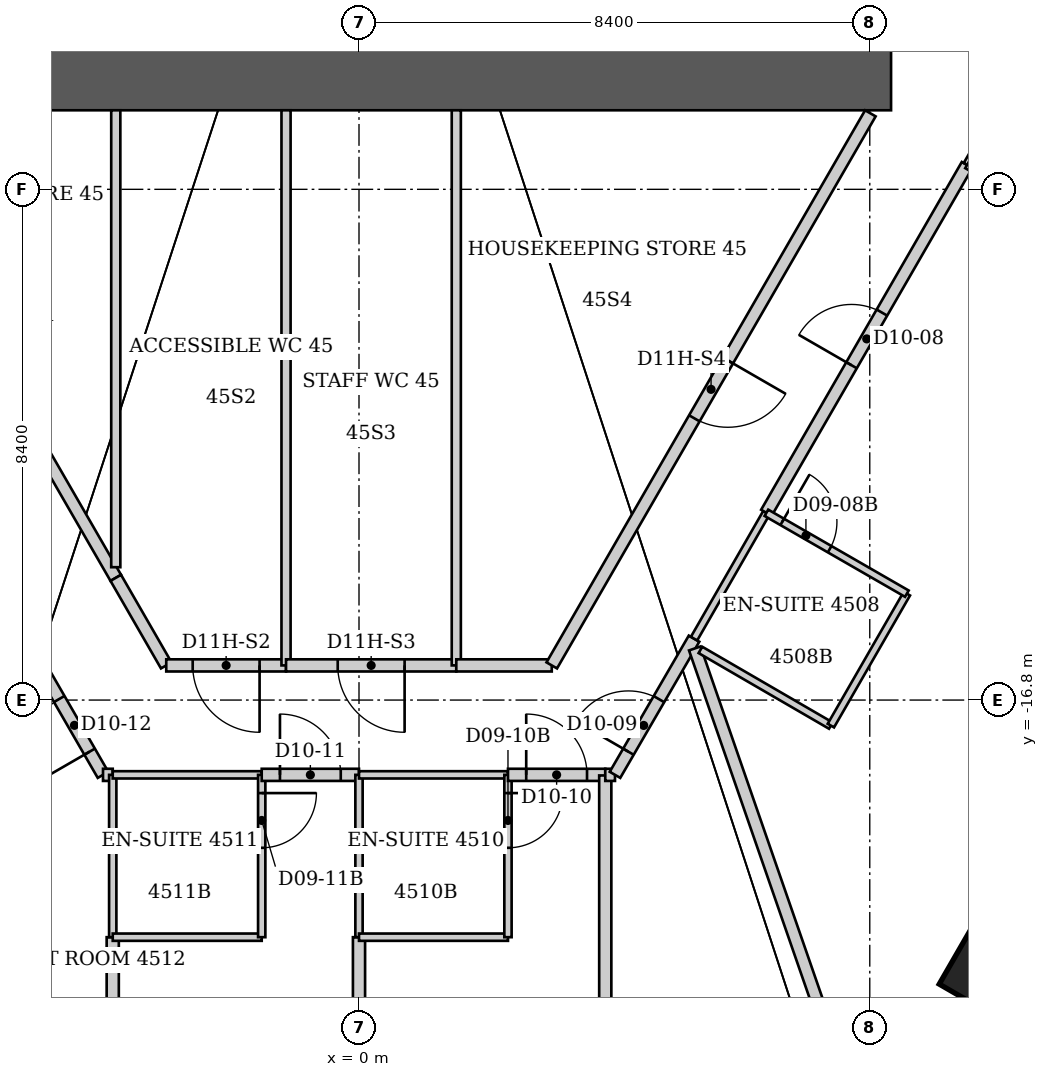
"""IFC4 building model, lengths in metres.
Left out: names, types, materials, properties, quantities, classifications, styles, units other than length and angle.
Written with IfcOpenShell. Run it as: python <this file> out.ifc"""

import sys

from ifc_helpers import new_model, si_unit, direction, frame, frame_2d, origin, origin_2d, place, context, subcontext, project, spatial, rectangle, extrude, element, fill, save


model = new_model("IFC4")
c1 = context("Model", 3, precision=1e-05, world=origin(), true_north=direction((0.0, 1.0)))
c2 = subcontext(c1, "Body", "Model", "MODEL_VIEW")
j1 = project(units=[si_unit("LENGTHUNIT", "METRE"), si_unit("PLANEANGLEUNIT", "RADIAN")], contexts=[c1])
p1 = place(None, origin())
s1 = spatial("IfcSite", under=j1, at=p1, CompositionType="ELEMENT")
p2 = place(p1, origin())
s2 = spatial("IfcBuilding", under=s1, at=p2, CompositionType="ELEMENT")
p3 = place(p2, frame((0.0, 0.0, 183.2)))
s3 = spatial("IfcBuildingStorey", under=s2, at=p3, CompositionType="ELEMENT", Elevation=183.2)
p4 = place(p3, frame((10.772, -21.142, 0.0), z_axis=(0.0, 0.0, 1.0), x_axis=(0.866025403784, -0.5, 0.0)))
e1 = element("IfcColumn", 1, at=p4, inside=s3, PredefinedType="COLUMN", context=c2, shape_type="SweptSolid", body=[
    extrude(rectangle(XDim=1.8, YDim=1.8, at=origin_2d()), origin(), (0.0, 0.0, 1.0), 3.8),
])
p5 = place(p3, frame((-8.75, -6.6, 0.0), z_axis=(0.0, 0.0, 1.0), x_axis=(1.0, 0.0, 0.0)))
e2 = element("IfcWall", 2, at=p5, inside=s3, PredefinedType="SHEAR", context=c2, shape_type="SweptSolid", body=[
    extrude(rectangle(XDim=17.5, YDim=1.0, at=frame_2d((8.75, 0.0))), origin(), (0.0, 0.0, 1.0), 3.8),
])
p6 = place(p3, frame((-5.48, -15.83, 0.0), z_axis=(0.0, 0.0, 1.0), x_axis=(0.499963722229, -0.866046347752, 0.0)))
e3 = element("IfcWall", 3, at=p6, inside=s3, PredefinedType="PARTITIONING", context=c2, shape_type="SweptSolid", body=[
    extrude(rectangle(XDim=2.54, YDim=0.2, at=frame_2d((1.27, 0.0))), origin(), (0.0, 0.0, 1.0), 3.64),
])
p7 = place(p6, frame((1.1, 0.0, 0.0)))
e4 = element("IfcOpeningElement", 4, at=p7, cuts=e3, PredefinedType="OPENING", context=c2, shape_type="SweptSolid", body=[
    extrude(rectangle(XDim=1.0, YDim=2.13, at=frame_2d((0.5, 1.065))), frame((0.0, 0.1, 0.0), z_axis=(0.0, -1.0, 0.0), x_axis=(1.0, 0.0, 0.0)), (0.0, 0.0, 1.0), 0.2),
])
p8 = place(p3, frame((-4.21, -18.03, 0.0), z_axis=(0.0, 0.0, 1.0), x_axis=(1.0, 0.0, 0.0)))
e5 = element("IfcWall", 5, at=p8, inside=s3, PredefinedType="PARTITIONING", context=c2, shape_type="SweptSolid", body=[
    extrude(rectangle(XDim=0.16, YDim=0.2, at=frame_2d((0.08, 0.0))), origin(), (0.0, 0.0, 1.0), 3.64),
])
p9 = place(p3, frame((-4.05, -21.77, 0.0), z_axis=(0.0, 0.0, 1.0), x_axis=(0.0, 1.0, 0.0)))
e6 = element("IfcWall", 6, at=p9, inside=s3, PredefinedType="PARTITIONING", context=c2, shape_type="SweptSolid", body=[
    extrude(rectangle(XDim=1.07, YDim=0.2, at=frame_2d((0.535, 0.0))), origin(), (0.0, 0.0, 1.0), 3.64),
])
p10 = place(p3, frame((-4.05, -20.7, 0.0), z_axis=(0.0, 0.0, 1.0), x_axis=(0.0, 1.0, 0.0)))
e7 = element("IfcWall", 7, at=p10, inside=s3, PredefinedType="PARTITIONING", context=c2, shape_type="SweptSolid", body=[
    extrude(rectangle(XDim=2.67, YDim=0.12, at=frame_2d((1.335, 0.0))), origin(), (0.0, 0.0, 1.0), 3.64),
])
for number, where, z_axis, x_axis in (
    (8, (-4.05, -20.7, 0.0), (0.0, 0.0, 1.0), (1.0, 0.0, 0.0)),
    (9, (-4.05, -18.03, 0.0), (0.0, 0.0, 1.0), (1.0, 0.0, 0.0)),
):
    element("IfcWall", number, at=place(p3, frame(where, z_axis=z_axis, x_axis=x_axis)), inside=s3, PredefinedType="PARTITIONING", context=c2, shape_type="SweptSolid", body=[
        extrude(rectangle(XDim=2.45, YDim=0.12, at=frame_2d((1.225, 0.0))), origin(), (0.0, 0.0, 1.0), 3.64),
    ])
p11 = place(p3, frame((-4.0, -14.79, 0.0), z_axis=(0.0, 0.0, 1.0), x_axis=(-0.499916512745, 0.866073599808, 0.0)))
e10 = element("IfcWall", 10, at=p11, inside=s3, PredefinedType="PARTITIONING", context=c2, shape_type="SweptSolid", body=[
    extrude(rectangle(XDim=8.821, YDim=0.2, at=frame_2d((4.411, 0.0))), origin(), (0.0, 0.0, 1.0), 3.64),
])
p12 = place(p11, frame((3.861, 0.0, 0.0)))
e11 = element("IfcOpeningElement", 11, at=p12, cuts=e10, PredefinedType="OPENING", context=c2, shape_type="SweptSolid", body=[
    extrude(rectangle(XDim=1.1, YDim=2.2, at=frame_2d((0.55, 1.1))), frame((0.0, 0.1, 0.0), z_axis=(0.0, -1.0, 0.0), x_axis=(1.0, 0.0, 0.0)), (0.0, 0.0, 1.0), 0.2),
])
p13 = place(p3, frame((-4.0, -7.1, 0.0), z_axis=(0.0, 0.0, 1.0), x_axis=(0.0, -1.0, 0.0)))
e12 = element("IfcWall", 12, at=p13, inside=s3, PredefinedType="PARTITIONING", context=c2, shape_type="SweptSolid", body=[
    extrude(rectangle(XDim=7.515, YDim=0.15, at=frame_2d((3.757, 0.0))), origin(), (0.0, 0.0, 1.0), 3.64),
])
p14 = place(p3, frame((-3.17, -16.23, 0.0), z_axis=(0.0, 0.0, 1.0), x_axis=(-0.499425709803, 0.866356716594, 0.0)))
e13 = element("IfcWall", 13, at=p14, inside=s3, PredefinedType="PARTITIONING", context=c2, shape_type="SweptSolid", body=[
    extrude(rectangle(XDim=1.662, YDim=0.2, at=frame_2d((0.831, 0.0))), origin(), (0.0, 0.0, 1.0), 3.64),
])
p15 = place(p3, frame((-1.6, -20.7, 0.0), z_axis=(0.0, 0.0, 1.0), x_axis=(0.0, 1.0, 0.0)))
e14 = element("IfcWall", 14, at=p15, inside=s3, PredefinedType="PARTITIONING", context=c2, shape_type="SweptSolid", body=[
    extrude(rectangle(XDim=2.67, YDim=0.12, at=frame_2d((1.335, 0.0))), origin(), (0.0, 0.0, 1.0), 3.64),
])
p16 = place(p15, frame((1.47, 0.0, 0.0)))
e15 = element("IfcOpeningElement", 15, at=p16, cuts=e14, PredefinedType="OPENING", context=c2, shape_type="SweptSolid", body=[
    extrude(rectangle(XDim=0.9, YDim=2.03, at=frame_2d((0.45, 1.015))), frame((0.0, 0.06, 0.0), z_axis=(0.0, -1.0, 0.0), x_axis=(1.0, 0.0, 0.0)), (0.0, 0.0, 1.0), 0.12),
])
p17 = place(p3, frame((-1.6, -18.03, 0.0), z_axis=(0.0, 0.0, 1.0), x_axis=(1.0, 0.0, 0.0)))
e16 = element("IfcWall", 16, at=p17, inside=s3, PredefinedType="PARTITIONING", context=c2, shape_type="SweptSolid", body=[
    extrude(rectangle(XDim=1.6, YDim=0.2, at=frame_2d((0.8, 0.0))), origin(), (0.0, 0.0, 1.0), 3.64),
])
p18 = place(p17, frame((0.3, 0.0, 0.0)))
e17 = element("IfcOpeningElement", 17, at=p18, cuts=e16, PredefinedType="OPENING", context=c2, shape_type="SweptSolid", body=[
    extrude(rectangle(XDim=1.0, YDim=2.13, at=frame_2d((0.5, 1.065))), frame((0.0, 0.1, 0.0), z_axis=(0.0, -1.0, 0.0), x_axis=(1.0, 0.0, 0.0)), (0.0, 0.0, 1.0), 0.2),
])
p19 = place(p3, frame((-1.2, -16.23, 0.0), z_axis=(0.0, 0.0, 1.0), x_axis=(-1.0, 0.0, 0.0)))
e18 = element("IfcWall", 18, at=p19, inside=s3, PredefinedType="PARTITIONING", context=c2, shape_type="SweptSolid", body=[
    extrude(rectangle(XDim=1.97, YDim=0.2, at=frame_2d((0.985, 0.0))), origin(), (0.0, 0.0, 1.0), 3.64),
])
p20 = place(p19, frame((0.435, 0.0, 0.0)))
e19 = element("IfcOpeningElement", 19, at=p20, cuts=e18, PredefinedType="OPENING", context=c2, shape_type="SweptSolid", body=[
    extrude(rectangle(XDim=1.1, YDim=2.2, at=frame_2d((0.55, 1.1))), frame((0.0, 0.1, 0.0), z_axis=(0.0, -1.0, 0.0), x_axis=(1.0, 0.0, 0.0)), (0.0, 0.0, 1.0), 0.2),
])
p21 = place(p3, frame((-1.2, -7.1, 0.0), z_axis=(0.0, 0.0, 1.0), x_axis=(0.0, -1.0, 0.0)))
e20 = element("IfcWall", 20, at=p21, inside=s3, PredefinedType="PARTITIONING", context=c2, shape_type="SweptSolid", body=[
    extrude(rectangle(XDim=9.13, YDim=0.15, at=frame_2d((4.565, 0.0))), origin(), (0.0, 0.0, 1.0), 3.64),
])
p22 = place(p3, frame((0.0, -26.41, 0.0), z_axis=(0.0, 0.0, 1.0), x_axis=(0.0, 1.0, 0.0)))
e21 = element("IfcWall", 21, at=p22, inside=s3, PredefinedType="PARTITIONING", context=c2, shape_type="SweptSolid", body=[
    extrude(rectangle(XDim=5.71, YDim=0.2, at=frame_2d((2.855, 0.0))), origin(), (0.0, 0.0, 1.0), 2.726),
])
p23 = place(p3, frame((0.0, -20.7, 0.0), z_axis=(0.0, 0.0, 1.0), x_axis=(0.0, 1.0, 0.0)))
e22 = element("IfcWall", 22, at=p23, inside=s3, PredefinedType="PARTITIONING", context=c2, shape_type="SweptSolid", body=[
    extrude(rectangle(XDim=2.67, YDim=0.12, at=frame_2d((1.335, 0.0))), origin(), (0.0, 0.0, 1.0), 2.726),
])
for number, where, z_axis, x_axis in (
    (23, (0.0, -20.7, 0.0), (0.0, 0.0, 1.0), (1.0, 0.0, 0.0)),
    (24, (0.0, -18.03, 0.0), (0.0, 0.0, 1.0), (1.0, 0.0, 0.0)),
):
    element("IfcWall", number, at=place(p3, frame(where, z_axis=z_axis, x_axis=x_axis)), inside=s3, PredefinedType="PARTITIONING", context=c2, shape_type="SweptSolid", body=[
        extrude(rectangle(XDim=2.45, YDim=0.12, at=frame_2d((1.225, 0.0))), origin(), (0.0, 0.0, 1.0), 3.64),
    ])
p24 = place(p3, frame((1.6, -16.23, 0.0), z_axis=(0.0, 0.0, 1.0), x_axis=(-1.0, 0.0, 0.0)))
e25 = element("IfcWall", 25, at=p24, inside=s3, PredefinedType="PARTITIONING", context=c2, shape_type="SweptSolid", body=[
    extrude(rectangle(XDim=2.8, YDim=0.2, at=frame_2d((1.4, 0.0))), origin(), (0.0, 0.0, 1.0), 3.64),
])
p25 = place(p24, frame((0.85, 0.0, 0.0)))
e26 = element("IfcOpeningElement", 26, at=p25, cuts=e25, PredefinedType="OPENING", context=c2, shape_type="SweptSolid", body=[
    extrude(rectangle(XDim=1.1, YDim=2.2, at=frame_2d((0.55, 1.1))), frame((0.0, 0.1, 0.0), z_axis=(0.0, -1.0, 0.0), x_axis=(1.0, 0.0, 0.0)), (0.0, 0.0, 1.0), 0.2),
])
p26 = place(p3, frame((1.6, -7.1, 0.0), z_axis=(0.0, 0.0, 1.0), x_axis=(0.0, -1.0, 0.0)))
e27 = element("IfcWall", 27, at=p26, inside=s3, PredefinedType="PARTITIONING", context=c2, shape_type="SweptSolid", body=[
    extrude(rectangle(XDim=9.13, YDim=0.15, at=frame_2d((4.565, 0.0))), origin(), (0.0, 0.0, 1.0), 3.64),
])
p27 = place(p3, frame((2.45, -20.7, 0.0), z_axis=(0.0, 0.0, 1.0), x_axis=(0.0, 1.0, 0.0)))
e28 = element("IfcWall", 28, at=p27, inside=s3, PredefinedType="PARTITIONING", context=c2, shape_type="SweptSolid", body=[
    extrude(rectangle(XDim=2.67, YDim=0.12, at=frame_2d((1.335, 0.0))), origin(), (0.0, 0.0, 1.0), 3.64),
])
p28 = place(p27, frame((1.47, 0.0, 0.0)))
e29 = element("IfcOpeningElement", 29, at=p28, cuts=e28, PredefinedType="OPENING", context=c2, shape_type="SweptSolid", body=[
    extrude(rectangle(XDim=0.9, YDim=2.03, at=frame_2d((0.45, 1.015))), frame((0.0, 0.06, 0.0), z_axis=(0.0, -1.0, 0.0), x_axis=(1.0, 0.0, 0.0)), (0.0, 0.0, 1.0), 0.12),
])
p29 = place(p3, frame((2.45, -18.03, 0.0), z_axis=(0.0, 0.0, 1.0), x_axis=(1.0, 0.0, 0.0)))
e30 = element("IfcWall", 30, at=p29, inside=s3, PredefinedType="PARTITIONING", context=c2, shape_type="SweptSolid", body=[
    extrude(rectangle(XDim=1.6, YDim=0.2, at=frame_2d((0.8, 0.0))), origin(), (0.0, 0.0, 1.0), 3.64),
])
p30 = place(p29, frame((0.3, 0.0, 0.0)))
e31 = element("IfcOpeningElement", 31, at=p30, cuts=e30, PredefinedType="OPENING", context=c2, shape_type="SweptSolid", body=[
    extrude(rectangle(XDim=1.0, YDim=2.13, at=frame_2d((0.5, 1.065))), frame((0.0, 0.1, 0.0), z_axis=(0.0, -1.0, 0.0), x_axis=(1.0, 0.0, 0.0)), (0.0, 0.0, 1.0), 0.2),
])
p31 = place(p3, frame((3.17, -16.23, 0.0), z_axis=(0.0, 0.0, 1.0), x_axis=(-1.0, 0.0, 0.0)))
e32 = element("IfcWall", 32, at=p31, inside=s3, PredefinedType="PARTITIONING", context=c2, shape_type="SweptSolid", body=[
    extrude(rectangle(XDim=1.57, YDim=0.2, at=frame_2d((0.785, 0.0))), origin(), (0.0, 0.0, 1.0), 3.64),
])
p32 = place(p3, frame((4.05, -21.87, 0.0), z_axis=(0.0, 0.0, 1.0), x_axis=(0.0, 1.0, 0.0)))
e33 = element("IfcWall", 33, at=p32, inside=s3, PredefinedType="PARTITIONING", context=c2, shape_type="SweptSolid", body=[
    extrude(rectangle(XDim=3.83, YDim=0.2, at=frame_2d((1.915, 0.0))), origin(), (0.0, 0.0, 1.0), 3.64),
])
p33 = place(p3, frame((4.05, -18.03, 0.0), z_axis=(0.0, 0.0, 1.0), x_axis=(1.0, 0.0, 0.0)))
e34 = element("IfcWall", 34, at=p33, inside=s3, PredefinedType="PARTITIONING", context=c2, shape_type="SweptSolid", body=[
    extrude(rectangle(XDim=0.16, YDim=0.2, at=frame_2d((0.08, 0.0))), origin(), (0.0, 0.0, 1.0), 3.64),
])
p34 = place(p3, frame((5.51, -15.79, 0.0), z_axis=(0.0, 0.0, 1.0), x_axis=(-0.501964949025, -0.864887963814, 0.0)))
e35 = element("IfcWall", 35, at=p34, inside=s3, PredefinedType="PARTITIONING", context=c2, shape_type="SweptSolid", body=[
    extrude(rectangle(XDim=2.59, YDim=0.2, at=frame_2d((1.295, 0.0))), origin(), (0.0, 0.0, 1.0), 3.64),
])
p35 = place(p34, frame((1.15, 0.0, 0.0)))
e36 = element("IfcOpeningElement", 36, at=p35, cuts=e35, PredefinedType="OPENING", context=c2, shape_type="SweptSolid", body=[
    extrude(rectangle(XDim=1.0, YDim=2.13, at=frame_2d((0.5, 1.065))), frame((0.0, 0.1, 0.0), z_axis=(0.0, -1.0, 0.0), x_axis=(1.0, 0.0, 0.0)), (0.0, 0.0, 1.0), 0.2),
])
p36 = place(p3, frame((5.51, -15.79, 0.0), z_axis=(0.0, 0.0, 1.0), x_axis=(0.49836161924, 0.866969259241, 0.0)))
e37 = element("IfcWall", 37, at=p36, inside=s3, PredefinedType="PARTITIONING", context=c2, shape_type="SweptSolid", body=[
    extrude(rectangle(XDim=2.388, YDim=0.12, at=frame_2d((1.194, 0.0))), origin(), (0.0, 0.0, 1.0), 3.64),
])
p37 = place(p3, frame((5.522, -15.951, 0.0), z_axis=(0.0, 0.0, 1.0), x_axis=(0.327588517074, -0.944820492729, 0.0)))
e38 = element("IfcWall", 38, at=p37, inside=s3, PredefinedType="PARTITIONING", context=c2, shape_type="SweptSolid", body=[
    extrude(rectangle(XDim=10.648, YDim=0.2, at=frame_2d((5.324, 0.0))), origin(), (0.0, 0.0, 1.0), 3.64),
])
p38 = place(p3, frame((5.615, -15.975, 0.0), z_axis=(0.0, 0.0, 1.0), x_axis=(0.864873056518, -0.501990633487, 0.0)))
e39 = element("IfcWall", 39, at=p38, inside=s3, PredefinedType="PARTITIONING", context=c2, shape_type="SweptSolid", body=[
    extrude(rectangle(XDim=2.48, YDim=0.12, at=frame_2d((1.24, 0.0))), origin(), (0.0, 0.0, 1.0), 3.038),
])
p39 = place(p3, frame((6.7, -13.72, 0.0), z_axis=(0.0, 0.0, 1.0), x_axis=(0.499729921425, 0.866181277581, 0.0)))
e40 = element("IfcWall", 40, at=p39, inside=s3, PredefinedType="PARTITIONING", context=c2, shape_type="SweptSolid", body=[
    extrude(rectangle(XDim=6.604, YDim=0.2, at=frame_2d((3.302, 0.0))), origin(), (0.0, 0.0, 1.0), 3.64),
])
p40 = place(p39, frame((2.802, 0.0, 0.0)))
e41 = element("IfcOpeningElement", 41, at=p40, cuts=e40, PredefinedType="OPENING", context=c2, shape_type="SweptSolid", body=[
    extrude(rectangle(XDim=1.0, YDim=2.13, at=frame_2d((0.5, 1.065))), frame((0.0, 0.1, 0.0), z_axis=(0.0, -1.0, 0.0), x_axis=(1.0, 0.0, 0.0)), (0.0, 0.0, 1.0), 0.2),
])
p41 = place(p3, frame((7.76, -17.22, 0.0), z_axis=(0.0, 0.0, 1.0), x_axis=(0.499159685399, 0.866510016372, 0.0)))
e42 = element("IfcWall", 42, at=p41, inside=s3, PredefinedType="PARTITIONING", context=c2, shape_type="SweptSolid", body=[
    extrude(rectangle(XDim=2.504, YDim=0.12, at=frame_2d((1.252, 0.0))), origin(), (0.0, 0.0, 1.0), 3.64),
])
p42 = place(p3, frame((8.41, -7.15, 0.0), z_axis=(0.0, 0.0, 1.0), x_axis=(-0.499828628176, -0.866124322748, 0.0)))
e43 = element("IfcWall", 43, at=p42, inside=s3, PredefinedType="PARTITIONING", context=c2, shape_type="SweptSolid", body=[
    extrude(rectangle(XDim=10.484, YDim=0.2, at=frame_2d((5.242, 0.0))), origin(), (0.0, 0.0, 1.0), 3.64),
])
p43 = place(p42, frame((4.692, 0.0, 0.0)))
e44 = element("IfcOpeningElement", 44, at=p43, cuts=e43, PredefinedType="OPENING", context=c2, shape_type="SweptSolid", body=[
    extrude(rectangle(XDim=1.1, YDim=2.2, at=frame_2d((0.55, 1.1))), frame((0.0, 0.1, 0.0), z_axis=(0.0, -1.0, 0.0), x_axis=(1.0, 0.0, 0.0)), (0.0, 0.0, 1.0), 0.2),
])
p44 = place(p3, frame((9.01, -15.05, 0.0), z_axis=(0.0, 0.0, 1.0), x_axis=(-0.866615255992, 0.498976951453, 0.0)))
e45 = element("IfcWall", 45, at=p44, inside=s3, PredefinedType="PARTITIONING", context=c2, shape_type="SweptSolid", body=[
    extrude(rectangle(XDim=2.666, YDim=0.12, at=frame_2d((1.333, 0.0))), origin(), (0.0, 0.0, 1.0), 3.64),
])
p45 = place(p44, frame((1.466, 0.0, 0.0)))
e46 = element("IfcOpeningElement", 46, at=p45, cuts=e45, PredefinedType="OPENING", context=c2, shape_type="SweptSolid", body=[
    extrude(rectangle(XDim=0.9, YDim=2.03, at=frame_2d((0.45, 1.015))), frame((0.0, 0.06, 0.0), z_axis=(0.0, -1.0, 0.0), x_axis=(1.0, 0.0, 0.0)), (0.0, 0.0, 1.0), 0.12),
])
p46 = place(p3, frame((9.996, -7.998, 0.0), z_axis=(0.0, 0.0, 1.0), x_axis=(0.501188543314, 0.865338109672, 0.0)))
e47 = element("IfcWall", 47, at=p46, inside=s3, PredefinedType="PARTITIONING", context=c2, shape_type="SweptSolid", body=[
    extrude(rectangle(XDim=2.402, YDim=0.12, at=frame_2d((1.201, 0.0))), origin(), (0.0, 0.0, 1.0), 3.64),
])
p47 = place(p3, frame((10.0, -8.0, 0.0), z_axis=(0.0, 0.0, 1.0), x_axis=(0.866010296064, -0.500026166427, 0.0)))
e48 = element("IfcWall", 48, at=p47, inside=s3, PredefinedType="PARTITIONING", context=c2, shape_type="SweptSolid", body=[
    extrude(rectangle(XDim=2.621, YDim=0.12, at=frame_2d((1.311, 0.0))), origin(), (0.0, 0.0, 1.0), 3.038),
])
p48 = place(p40, origin())
e49 = element("IfcDoor", 49, at=p48, inside=s3, OperationType="SINGLE_SWING_LEFT", PredefinedType="DOOR", context=c2, shape_type="SweptSolid", body=[
    extrude(rectangle(XDim=1.0, YDim=2.13, at=frame_2d((0.5, 1.065))), frame((0.0, 0.025, 0.0), z_axis=(0.0, -1.0, 0.0), x_axis=(1.0, 0.0, 0.0)), (0.0, 0.0, 1.0), 0.05),
])
fill(e41, e49)
p49 = place(p45, origin())
e50 = element("IfcDoor", 50, at=p49, inside=s3, OperationType="SINGLE_SWING_RIGHT", PredefinedType="DOOR", context=c2, shape_type="SweptSolid", body=[
    extrude(rectangle(XDim=0.9, YDim=2.03, at=frame_2d((0.45, 1.015))), frame((0.0, 0.025, 0.0), z_axis=(0.0, -1.0, 0.0), x_axis=(1.0, 0.0, 0.0)), (0.0, 0.0, 1.0), 0.05),
])
fill(e46, e50)
p50 = place(p35, origin())
e51 = element("IfcDoor", 51, at=p50, inside=s3, OperationType="SINGLE_SWING_RIGHT", PredefinedType="DOOR", context=c2, shape_type="SweptSolid", body=[
    extrude(rectangle(XDim=1.0, YDim=2.13, at=frame_2d((0.5, 1.065))), frame((0.0, 0.025, 0.0), z_axis=(0.0, -1.0, 0.0), x_axis=(1.0, 0.0, 0.0)), (0.0, 0.0, 1.0), 0.05),
])
fill(e36, e51)
p51 = place(p30, origin())
e52 = element("IfcDoor", 52, at=p51, inside=s3, OperationType="SINGLE_SWING_LEFT", PredefinedType="DOOR", context=c2, shape_type="SweptSolid", body=[
    extrude(rectangle(XDim=1.0, YDim=2.13, at=frame_2d((0.5, 1.065))), frame((0.0, 0.025, 0.0), z_axis=(0.0, -1.0, 0.0), x_axis=(1.0, 0.0, 0.0)), (0.0, 0.0, 1.0), 0.05),
])
fill(e31, e52)
p52 = place(p28, origin())
e53 = element("IfcDoor", 53, at=p52, inside=s3, OperationType="SINGLE_SWING_RIGHT", PredefinedType="DOOR", context=c2, shape_type="SweptSolid", body=[
    extrude(rectangle(XDim=0.9, YDim=2.03, at=frame_2d((0.45, 1.015))), frame((0.0, 0.025, 0.0), z_axis=(0.0, -1.0, 0.0), x_axis=(1.0, 0.0, 0.0)), (0.0, 0.0, 1.0), 0.05),
])
fill(e29, e53)
p53 = place(p18, origin())
e54 = element("IfcDoor", 54, at=p53, inside=s3, OperationType="SINGLE_SWING_LEFT", PredefinedType="DOOR", context=c2, shape_type="SweptSolid", body=[
    extrude(rectangle(XDim=1.0, YDim=2.13, at=frame_2d((0.5, 1.065))), frame((0.0, 0.025, 0.0), z_axis=(0.0, -1.0, 0.0), x_axis=(1.0, 0.0, 0.0)), (0.0, 0.0, 1.0), 0.05),
])
fill(e17, e54)
p54 = place(p16, origin())
e55 = element("IfcDoor", 55, at=p54, inside=s3, OperationType="SINGLE_SWING_RIGHT", PredefinedType="DOOR", context=c2, shape_type="SweptSolid", body=[
    extrude(rectangle(XDim=0.9, YDim=2.03, at=frame_2d((0.45, 1.015))), frame((0.0, 0.025, 0.0), z_axis=(0.0, -1.0, 0.0), x_axis=(1.0, 0.0, 0.0)), (0.0, 0.0, 1.0), 0.05),
])
fill(e15, e55)
p55 = place(p7, origin())
e56 = element("IfcDoor", 56, at=p55, inside=s3, OperationType="SINGLE_SWING_RIGHT", PredefinedType="DOOR", context=c2, shape_type="SweptSolid", body=[
    extrude(rectangle(XDim=1.0, YDim=2.13, at=frame_2d((0.5, 1.065))), frame((0.0, 0.025, 0.0), z_axis=(0.0, -1.0, 0.0), x_axis=(1.0, 0.0, 0.0)), (0.0, 0.0, 1.0), 0.05),
])
fill(e4, e56)
p56 = place(p20, origin())
e57 = element("IfcDoor", 57, at=p56, inside=s3, OperationType="SINGLE_SWING_LEFT", PredefinedType="DOOR", context=c2, shape_type="SweptSolid", body=[
    extrude(rectangle(XDim=1.1, YDim=2.2, at=frame_2d((0.55, 1.1))), frame((0.0, 0.025, 0.0), z_axis=(0.0, -1.0, 0.0), x_axis=(1.0, 0.0, 0.0)), (0.0, 0.0, 1.0), 0.05),
])
fill(e19, e57)
p57 = place(p25, origin())
e58 = element("IfcDoor", 58, at=p57, inside=s3, OperationType="SINGLE_SWING_LEFT", PredefinedType="DOOR", context=c2, shape_type="SweptSolid", body=[
    extrude(rectangle(XDim=1.1, YDim=2.2, at=frame_2d((0.55, 1.1))), frame((0.0, 0.025, 0.0), z_axis=(0.0, -1.0, 0.0), x_axis=(1.0, 0.0, 0.0)), (0.0, 0.0, 1.0), 0.05),
])
fill(e26, e58)
p58 = place(p43, origin())
e59 = element("IfcDoor", 59, at=p58, inside=s3, OperationType="SINGLE_SWING_LEFT", PredefinedType="DOOR", context=c2, shape_type="SweptSolid", body=[
    extrude(rectangle(XDim=1.1, YDim=2.2, at=frame_2d((0.55, 1.1))), frame((0.0, 0.025, 0.0), z_axis=(0.0, -1.0, 0.0), x_axis=(1.0, 0.0, 0.0)), (0.0, 0.0, 1.0), 0.05),
])
fill(e44, e59)
save(model, sys.argv[1])
